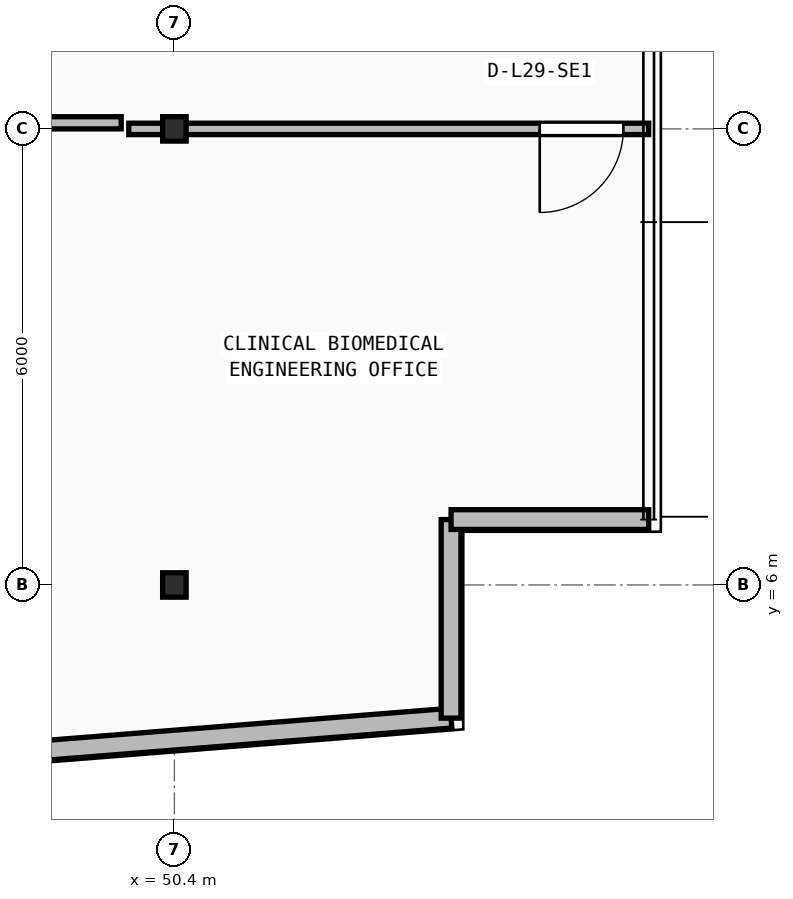
"""IFC4 building model, lengths in metres.
Left out: names, types, materials, properties, quantities, classifications, styles, units other than length and angle.
Written with IfcOpenShell. Run it as: python <this file> out.ifc"""

import sys

from ifc_helpers import new_model, si_unit, direction, frame, frame_2d, origin, origin_2d, place, context, subcontext, project, spatial, rectangle, i_section, extrude, element, fill, save


model = new_model("IFC4")
c1 = context("Model", 3, precision=1e-05, world=origin(), true_north=direction((0.0, 1.0)))
c2 = subcontext(c1, "Body", "Model", "MODEL_VIEW")
j1 = project(units=[si_unit("LENGTHUNIT", "METRE"), si_unit("PLANEANGLEUNIT", "RADIAN")], contexts=[c1])
p1 = place(None, origin())
s1 = spatial("IfcSite", under=j1, at=p1, CompositionType="ELEMENT")
p2 = place(p1, origin())
s2 = spatial("IfcBuilding", under=s1, at=p2, CompositionType="ELEMENT")
p3 = place(p2, frame((0.0, 0.0, 119.15)))
s3 = spatial("IfcBuildingStorey", under=s2, at=p3, CompositionType="ELEMENT", Elevation=119.15)
for number, where, z_axis, x_axis in (
    (1, (50.4, 6.0, 0.0), (0.0, 0.0, 1.0), (1.0, 0.0, 0.0)),
    (2, (50.4, 12.0, 0.0), (0.0, 0.0, 1.0), (1.0, 0.0, 0.0)),
):
    element("IfcColumn", number, at=place(p3, frame(where, z_axis=z_axis, x_axis=x_axis)), inside=s3, PredefinedType="COLUMN", context=c2, shape_type="SweptSolid", body=[
        extrude(i_section(OverallWidth=0.309, OverallDepth=0.321, WebThickness=0.014, FlangeThickness=0.022, FilletRadius=0.017, at=origin_2d()), origin(), (0.0, 0.0, 1.0), 3.95),
    ])
p4 = place(p3, frame((2.76, 0.173, 0.0), z_axis=(0.0, 0.0, 1.0), x_axis=(0.996857931723, 0.079210251617, 0.0)))
e3 = element("IfcWall", 3, at=p4, inside=s3, PredefinedType="STANDARD", context=c2, shape_type="SweptSolid", body=[
    extrude(rectangle(XDim=51.442, YDim=0.26, at=frame_2d((25.721, 0.0))), origin(), (0.0, 0.0, 1.0), 3.71),
])
p5 = place(p4, frame((24.521, 0.0, 0.9)))
e4 = element("IfcOpeningElement", 4, at=p5, cuts=e3, PredefinedType="OPENING", context=c2, shape_type="SweptSolid", body=[
    extrude(rectangle(XDim=2.4, YDim=1.65, at=frame_2d((1.2, 0.825))), frame((0.0, 0.14, 0.0), z_axis=(0.0, -1.0, 0.0), x_axis=(1.0, 0.0, 0.0)), (0.0, 0.0, 1.0), 0.28),
])
p6 = place(p3, frame((54.04, 4.248, 0.0), z_axis=(0.0, 0.0, 1.0), x_axis=(0.0, 1.0, 0.0)))
e5 = element("IfcWall", 5, at=p6, inside=s3, PredefinedType="STANDARD", context=c2, shape_type="SweptSolid", body=[
    extrude(rectangle(XDim=2.612, YDim=0.26, at=frame_2d((1.306, 0.0))), origin(), (0.0, 0.0, 1.0), 3.71),
])
p7 = place(p3, frame((54.04, 6.86, 0.0), z_axis=(0.0, 0.0, 1.0), x_axis=(1.0, 0.0, 0.0)))
e6 = element("IfcWall", 6, at=p7, inside=s3, PredefinedType="STANDARD", context=c2, shape_type="SweptSolid", body=[
    extrude(rectangle(XDim=2.6, YDim=0.26, at=frame_2d((1.3, 0.0))), origin(), (0.0, 0.0, 1.0), 3.71),
])
p8 = place(p3, frame((56.64, 12.0, 0.0), z_axis=(0.0, 0.0, 1.0), x_axis=(-1.0, 0.0, 0.0)))
e7 = element("IfcWall", 7, at=p8, inside=s3, PredefinedType="PARTITIONING", context=c2, shape_type="SweptSolid", body=[
    extrude(rectangle(XDim=6.84, YDim=0.15, at=frame_2d((3.42, 0.0))), origin(), (0.0, 0.0, 1.0), 3.083),
])
p9 = place(p8, frame((0.333, 0.0, 0.0)))
e8 = element("IfcOpeningElement", 8, at=p9, cuts=e7, PredefinedType="OPENING", context=c2, shape_type="SweptSolid", body=[
    extrude(rectangle(XDim=1.1, YDim=2.1, at=frame_2d((0.55, 1.05))), frame((0.0, 0.085, 0.0), z_axis=(0.0, -1.0, 0.0), x_axis=(1.0, 0.0, 0.0)), (0.0, 0.0, 1.0), 0.17),
])
p10 = place(p3, frame((46.689, 12.08, 0.0), z_axis=(0.0, 0.0, 1.0), x_axis=(1.0, 0.0, 0.0)))
e9 = element("IfcWall", 9, at=p10, inside=s3, PredefinedType="PARTITIONING", context=c2, shape_type="SweptSolid", body=[
    extrude(rectangle(XDim=3.011, YDim=0.16, at=frame_2d((1.505, 0.0))), origin(), (0.0, 0.0, 1.0), 3.083),
])
p11 = place(p9, origin())
e10 = element("IfcDoor", 10, at=p11, inside=s3, OperationType="SINGLE_SWING_RIGHT", PredefinedType="DOOR", context=c2, shape_type="SweptSolid", body=[
    extrude(rectangle(XDim=1.1, YDim=2.1, at=frame_2d((0.55, 1.05))), frame((0.0, 0.025, 0.0), z_axis=(0.0, -1.0, 0.0), x_axis=(1.0, 0.0, 0.0)), (0.0, 0.0, 1.0), 0.05),
])
fill(e8, e10)
save(model, sys.argv[1])
